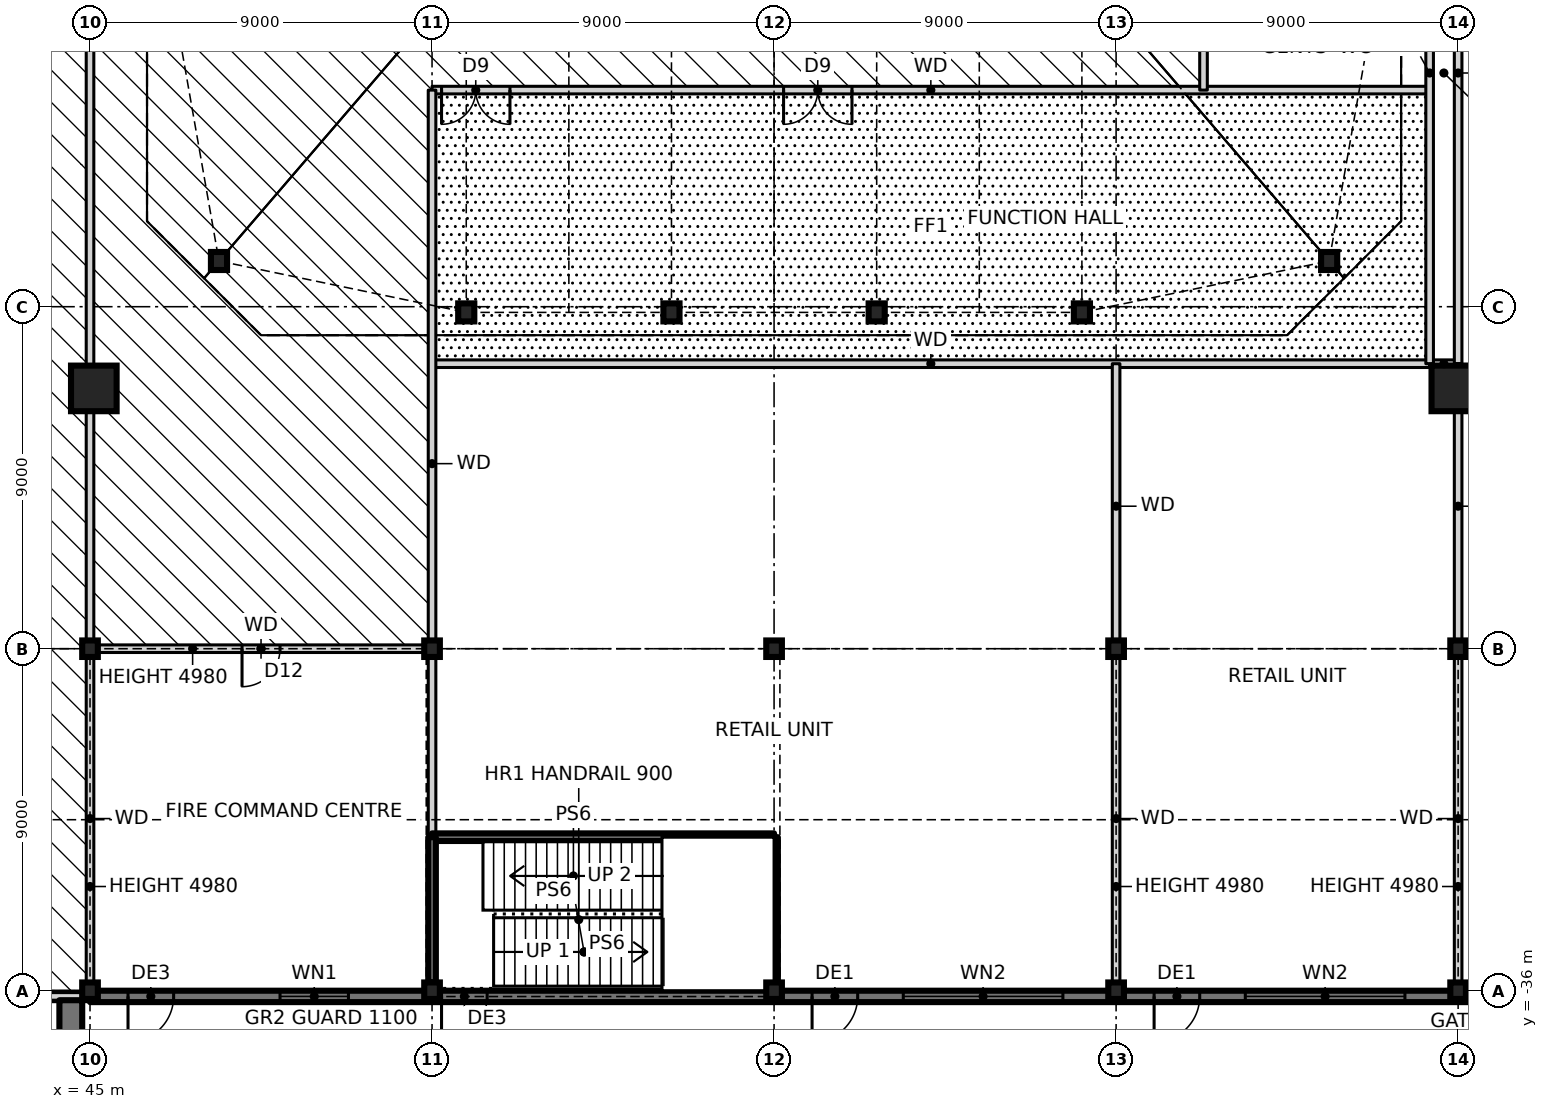
"""IFC4 building model, lengths in metres.
Left out: names, types, materials, properties, quantities, classifications, styles, units other than length and angle.
Written with IfcOpenShell. Run it as: python <this file> out.ifc"""

import sys

from ifc_helpers import new_model, si_unit, direction, frame, frame_2d, origin, origin_2d, place, context, subcontext, project, spatial, rectangle, hollow_rectangle, i_section, extrude, element, fill, save


model = new_model("IFC4")
c1 = context("Model", 3, precision=1e-05, world=origin(), true_north=direction((0.0, 1.0)))
c2 = subcontext(c1, "Body", "Model", "MODEL_VIEW")
j1 = project(units=[si_unit("LENGTHUNIT", "METRE"), si_unit("PLANEANGLEUNIT", "RADIAN")], contexts=[c1])
p1 = place(None, origin())
s1 = spatial("IfcSite", under=j1, at=p1, CompositionType="ELEMENT")
p2 = place(p1, origin())
s2 = spatial("IfcBuilding", under=s1, at=p2, CompositionType="ELEMENT")
p3 = place(p2, origin())
s3 = spatial("IfcBuildingStorey", under=s2, at=p3, CompositionType="ELEMENT", Elevation=0.0)
for number, where, z_axis, x_axis in (
    (1, (48.394, -16.797, 0.0), (0.0, 0.0, 1.0), (1.0, 0.0, 0.0)),
    (2, (54.9, -18.15, 0.0), (0.0, 0.0, 1.0), (1.0, 0.0, 0.0)),
    (3, (60.3, -18.15, 0.0), (0.0, 0.0, 1.0), (1.0, 0.0, 0.0)),
    (4, (65.7, -18.15, 0.0), (0.0, 0.0, 1.0), (1.0, 0.0, 0.0)),
    (5, (71.1, -18.15, 0.0), (0.0, 0.0, 1.0), (1.0, 0.0, 0.0)),
    (6, (77.606, -16.797, 0.0), (0.0, 0.0, 1.0), (1.0, 0.0, 0.0)),
):
    element("IfcColumn", number, at=place(p3, frame(where, z_axis=z_axis, x_axis=x_axis)), inside=s3, PredefinedType="COLUMN", context=c2, shape_type="SweptSolid", body=[
        extrude(i_section(OverallWidth=0.424, OverallDepth=0.475, WebThickness=0.048, FlangeThickness=0.077, at=origin_2d()), origin(), (0.0, 0.0, 1.0), 6.0),
    ])
for number, where, z_axis, x_axis in (
    (7, (45.1, -20.15, 0.0), (0.0, 0.0, 1.0), (1.0, 0.0, 0.0)),
    (8, (80.9, -20.15, 0.0), (0.0, 0.0, 1.0), (1.0, 0.0, 0.0)),
):
    element("IfcColumn", number, at=place(p3, frame(where, z_axis=z_axis, x_axis=x_axis)), inside=s3, PredefinedType="COLUMN", context=c2, shape_type="SweptSolid", body=[
        extrude(hollow_rectangle(XDim=1.2, YDim=1.2, WallThickness=0.07, at=origin_2d()), origin(), (0.0, 0.0, 1.0), 6.0),
    ])
for number, where, z_axis, x_axis in (
    (9, (45.0, -36.0, 0.0), (0.0, 0.0, 1.0), (1.0, 0.0, 0.0)),
    (10, (45.0, -27.0, 0.0), (0.0, 0.0, 1.0), (1.0, 0.0, 0.0)),
    (11, (54.0, -36.0, 0.0), (0.0, 0.0, 1.0), (1.0, 0.0, 0.0)),
    (12, (54.0, -27.0, 0.0), (0.0, 0.0, 1.0), (1.0, 0.0, 0.0)),
    (13, (63.0, -36.0, 0.0), (0.0, 0.0, 1.0), (1.0, 0.0, 0.0)),
    (14, (63.0, -27.0, 0.0), (0.0, 0.0, 1.0), (1.0, 0.0, 0.0)),
    (15, (72.0, -36.0, 0.0), (0.0, 0.0, 1.0), (1.0, 0.0, 0.0)),
    (16, (72.0, -27.0, 0.0), (0.0, 0.0, 1.0), (1.0, 0.0, 0.0)),
    (17, (81.0, -36.0, 0.0), (0.0, 0.0, 1.0), (1.0, 0.0, 0.0)),
    (18, (81.0, -27.0, 0.0), (0.0, 0.0, 1.0), (1.0, 0.0, 0.0)),
):
    element("IfcColumn", number, at=place(p3, frame(where, z_axis=z_axis, x_axis=x_axis)), inside=s3, PredefinedType="COLUMN", context=c2, shape_type="SweptSolid", body=[
        extrude(i_section(OverallWidth=0.411, OverallDepth=0.434, WebThickness=0.036, FlangeThickness=0.057, at=origin_2d()), origin(), (0.0, 0.0, 1.0), 6.0),
    ])
p4 = place(p3, frame((36.0, -36.15, -0.25), z_axis=(0.0, 0.0, 1.0), x_axis=(1.0, 0.0, 0.0)))
e19 = element("IfcWall", 19, at=p4, inside=s3, PredefinedType="SOLIDWALL", context=c2, shape_type="SweptSolid", body=[
    extrude(rectangle(XDim=9.0, YDim=0.2, at=frame_2d((4.5, 0.0))), origin(), (0.0, 0.0, 1.0), 6.25),
])
p5 = place(p4, frame((3.3, 0.0, 0.25)))
e20 = element("IfcOpeningElement", 20, at=p5, cuts=e19, PredefinedType="OPENING", context=c2, shape_type="SweptSolid", body=[
    extrude(rectangle(XDim=2.4, YDim=3.0, at=frame_2d((1.2, 1.5))), frame((0.0, 0.11, 0.0), z_axis=(0.0, -1.0, 0.0), x_axis=(1.0, 0.0, 0.0)), (0.0, 0.0, 1.0), 0.22),
])
p6 = place(p3, frame((45.0, -36.15, -0.25), z_axis=(0.0, 0.0, 1.0), x_axis=(1.0, 0.0, 0.0)))
e21 = element("IfcWall", 21, at=p6, inside=s3, PredefinedType="SOLIDWALL", context=c2, shape_type="SweptSolid", body=[
    extrude(rectangle(XDim=9.0, YDim=0.3, at=frame_2d((4.5, 0.0))), origin(), (0.0, 0.0, 1.0), 6.25),
])
p7 = place(p6, frame((1.0, 0.0, 0.25)))
e22 = element("IfcOpeningElement", 22, at=p7, cuts=e21, PredefinedType="OPENING", context=c2, shape_type="SweptSolid", body=[
    extrude(rectangle(XDim=1.2, YDim=2.4, at=frame_2d((0.6, 1.2))), frame((0.0, 0.16, 0.0), z_axis=(0.0, -1.0, 0.0), x_axis=(1.0, 0.0, 0.0)), (0.0, 0.0, 1.0), 0.32),
])
p8 = place(p6, frame((5.0, 0.0, 1.15)))
e23 = element("IfcOpeningElement", 23, at=p8, cuts=e21, PredefinedType="OPENING", context=c2, shape_type="SweptSolid", body=[
    extrude(rectangle(XDim=1.8, YDim=2.4, at=frame_2d((0.9, 1.2))), frame((0.0, 0.16, 0.0), z_axis=(0.0, -1.0, 0.0), x_axis=(1.0, 0.0, 0.0)), (0.0, 0.0, 1.0), 0.32),
])
p9 = place(p3, frame((54.0, -36.15, -0.25), z_axis=(0.0, 0.0, 1.0), x_axis=(1.0, 0.0, 0.0)))
e24 = element("IfcWall", 24, at=p9, inside=s3, PredefinedType="SOLIDWALL", context=c2, shape_type="SweptSolid", body=[
    extrude(rectangle(XDim=9.0, YDim=0.3, at=frame_2d((4.5, 0.0))), origin(), (0.0, 0.0, 1.0), 6.25),
])
p10 = place(p9, frame((0.25, 0.0, 0.25)))
e25 = element("IfcOpeningElement", 25, at=p10, cuts=e24, PredefinedType="OPENING", context=c2, shape_type="SweptSolid", body=[
    extrude(rectangle(XDim=1.2, YDim=2.4, at=frame_2d((0.6, 1.2))), frame((0.0, 0.16, 0.0), z_axis=(0.0, -1.0, 0.0), x_axis=(1.0, 0.0, 0.0)), (0.0, 0.0, 1.0), 0.32),
])
p11 = place(p3, frame((63.0, -36.15, -0.25), z_axis=(0.0, 0.0, 1.0), x_axis=(1.0, 0.0, 0.0)))
e26 = element("IfcWall", 26, at=p11, inside=s3, PredefinedType="SOLIDWALL", context=c2, shape_type="SweptSolid", body=[
    extrude(rectangle(XDim=9.0, YDim=0.3, at=frame_2d((4.5, 0.0))), origin(), (0.0, 0.0, 1.0), 6.25),
])
p12 = place(p11, frame((1.0, 0.0, 0.25)))
e27 = element("IfcOpeningElement", 27, at=p12, cuts=e26, PredefinedType="OPENING", context=c2, shape_type="SweptSolid", body=[
    extrude(rectangle(XDim=1.2, YDim=2.4, at=frame_2d((0.6, 1.2))), frame((0.0, 0.16, 0.0), z_axis=(0.0, -1.0, 0.0), x_axis=(1.0, 0.0, 0.0)), (0.0, 0.0, 1.0), 0.32),
])
p13 = place(p11, frame((3.4, 0.0, 0.85)))
e28 = element("IfcOpeningElement", 28, at=p13, cuts=e26, PredefinedType="OPENING", context=c2, shape_type="SweptSolid", body=[
    extrude(rectangle(XDim=4.2, YDim=3.6, at=frame_2d((2.1, 1.8))), frame((0.0, 0.16, 0.0), z_axis=(0.0, -1.0, 0.0), x_axis=(1.0, 0.0, 0.0)), (0.0, 0.0, 1.0), 0.32),
])
p14 = place(p3, frame((72.0, -36.15, -0.25), z_axis=(0.0, 0.0, 1.0), x_axis=(1.0, 0.0, 0.0)))
e29 = element("IfcWall", 29, at=p14, inside=s3, PredefinedType="SOLIDWALL", context=c2, shape_type="SweptSolid", body=[
    extrude(rectangle(XDim=9.0, YDim=0.3, at=frame_2d((4.5, 0.0))), origin(), (0.0, 0.0, 1.0), 6.25),
])
p15 = place(p14, frame((1.0, 0.0, 0.25)))
e30 = element("IfcOpeningElement", 30, at=p15, cuts=e29, PredefinedType="OPENING", context=c2, shape_type="SweptSolid", body=[
    extrude(rectangle(XDim=1.2, YDim=2.4, at=frame_2d((0.6, 1.2))), frame((0.0, 0.16, 0.0), z_axis=(0.0, -1.0, 0.0), x_axis=(1.0, 0.0, 0.0)), (0.0, 0.0, 1.0), 0.32),
])
p16 = place(p14, frame((3.4, 0.0, 0.85)))
e31 = element("IfcOpeningElement", 31, at=p16, cuts=e29, PredefinedType="OPENING", context=c2, shape_type="SweptSolid", body=[
    extrude(rectangle(XDim=4.2, YDim=3.6, at=frame_2d((2.1, 1.8))), frame((0.0, 0.16, 0.0), z_axis=(0.0, -1.0, 0.0), x_axis=(1.0, 0.0, 0.0)), (0.0, 0.0, 1.0), 0.32),
])
p17 = place(p3, frame((81.0, -36.15, -0.25), z_axis=(0.0, 0.0, 1.0), x_axis=(1.0, 0.0, 0.0)))
e32 = element("IfcWall", 32, at=p17, inside=s3, PredefinedType="SOLIDWALL", context=c2, shape_type="SweptSolid", body=[
    extrude(rectangle(XDim=9.0, YDim=0.3, at=frame_2d((4.5, 0.0))), origin(), (0.0, 0.0, 1.0), 6.25),
])
p18 = place(p17, frame((1.5, 0.0, 0.25)))
e33 = element("IfcOpeningElement", 33, at=p18, cuts=e32, PredefinedType="OPENING", context=c2, shape_type="SweptSolid", body=[
    extrude(rectangle(XDim=6.0, YDim=4.5, at=frame_2d((3.0, 2.25))), frame((0.0, 0.16, 0.0), z_axis=(0.0, -1.0, 0.0), x_axis=(1.0, 0.0, 0.0)), (0.0, 0.0, 1.0), 0.32),
])
p19 = place(p3, frame((44.494, -36.25, -0.15), z_axis=(0.0, 0.0, 1.0), x_axis=(0.0, -1.0, 0.0)))
e34 = element("IfcWall", 34, at=p19, inside=s3, PredefinedType="SOLIDWALL", context=c2, shape_type="SweptSolid", body=[
    extrude(rectangle(XDim=3.05, YDim=0.6, at=frame_2d((1.525, 0.0))), origin(), (0.0, 0.0, 1.0), 9.15),
])
p20 = place(p3, frame((54.0, -31.96, -0.25), z_axis=(0.0, 0.0, 1.0), x_axis=(1.0, 0.0, 0.0)))
e35 = element("IfcWall", 35, at=p20, inside=s3, PredefinedType="SOLIDWALL", context=c2, shape_type="SweptSolid", body=[
    extrude(rectangle(XDim=9.0, YDim=0.2, at=frame_2d((4.5, 0.0))), origin(), (0.0, 0.0, 1.0), 6.25),
])
p21 = place(p3, frame((45.0, -27.0, 0.0), z_axis=(0.0, 0.0, 1.0), x_axis=(1.0, 0.0, 0.0)))
e36 = element("IfcWall", 36, at=p21, inside=s3, PredefinedType="SOLIDWALL", context=c2, shape_type="SweptSolid", body=[
    extrude(rectangle(XDim=9.0, YDim=0.2, at=frame_2d((4.5, 0.0))), origin(), (0.0, 0.0, 1.0), 4.98),
])
p22 = place(p21, frame((4.0, 0.0, 0.0)))
e37 = element("IfcOpeningElement", 37, at=p22, cuts=e36, PredefinedType="OPENING", context=c2, shape_type="SweptSolid", body=[
    extrude(rectangle(XDim=1.0, YDim=2.1, at=frame_2d((0.5, 1.05))), frame((0.0, 0.11, 0.0), z_axis=(0.0, -1.0, 0.0), x_axis=(1.0, 0.0, 0.0)), (0.0, 0.0, 1.0), 0.22),
])
p23 = place(p3, frame((81.0, -27.0, 0.0), z_axis=(0.0, 0.0, 1.0), x_axis=(1.0, 0.0, 0.0)))
e38 = element("IfcWall", 38, at=p23, inside=s3, PredefinedType="SOLIDWALL", context=c2, shape_type="SweptSolid", body=[
    extrude(rectangle(XDim=8.94, YDim=0.2, at=frame_2d((4.47, 0.0))), origin(), (0.0, 0.0, 1.0), 4.98),
])
p24 = place(p3, frame((54.0, -19.5, 0.0), z_axis=(0.0, 0.0, 1.0), x_axis=(1.0, 0.0, 0.0)))
e39 = element("IfcWall", 39, at=p24, inside=s3, PredefinedType="SOLIDWALL", context=c2, shape_type="SweptSolid", body=[
    extrude(rectangle(XDim=26.25, YDim=0.2, at=frame_2d((13.125, 0.0))), origin(), (0.0, 0.0, 1.0), 5.75),
])
p25 = place(p3, frame((80.25, -19.5, 0.0), z_axis=(0.0, 0.0, 1.0), x_axis=(1.0, 0.0, 0.0)))
e40 = element("IfcWall", 40, at=p25, inside=s3, PredefinedType="SOLIDWALL", context=c2, shape_type="SweptSolid", body=[
    extrude(rectangle(XDim=0.75, YDim=0.2, at=frame_2d((0.375, 0.0))), origin(), (0.0, 0.0, 1.0), 6.0),
])
p26 = place(p3, frame((54.0, -12.3, 0.0), z_axis=(0.0, 0.0, 1.0), x_axis=(1.0, 0.0, 0.0)))
e41 = element("IfcWall", 41, at=p26, inside=s3, PredefinedType="SOLIDWALL", context=c2, shape_type="SweptSolid", body=[
    extrude(rectangle(XDim=26.25, YDim=0.2, at=frame_2d((13.125, 0.0))), origin(), (0.0, 0.0, 1.0), 5.75),
])
p27 = place(p26, frame((9.25, 0.0, 0.0)))
e42 = element("IfcOpeningElement", 42, at=p27, cuts=e41, PredefinedType="OPENING", context=c2, shape_type="SweptSolid", body=[
    extrude(rectangle(XDim=1.8, YDim=2.1, at=frame_2d((0.9, 1.05))), frame((0.0, 0.11, 0.0), z_axis=(0.0, -1.0, 0.0), x_axis=(1.0, 0.0, 0.0)), (0.0, 0.0, 1.0), 0.22),
])
p28 = place(p26, frame((0.25, 0.0, 0.0)))
e43 = element("IfcOpeningElement", 43, at=p28, cuts=e41, PredefinedType="OPENING", context=c2, shape_type="SweptSolid", body=[
    extrude(rectangle(XDim=1.8, YDim=2.1, at=frame_2d((0.9, 1.05))), frame((0.0, 0.11, 0.0), z_axis=(0.0, -1.0, 0.0), x_axis=(1.0, 0.0, 0.0)), (0.0, 0.0, 1.0), 0.22),
])
p29 = place(p3, frame((81.0, -35.94, 0.0), z_axis=(0.0, 0.0, 1.0), x_axis=(0.0, 1.0, 0.0)))
e44 = element("IfcWall", 44, at=p29, inside=s3, PredefinedType="SOLIDWALL", context=c2, shape_type="SweptSolid", body=[
    extrude(rectangle(XDim=8.94, YDim=0.2, at=frame_2d((4.47, 0.0))), origin(), (0.0, 0.0, 1.0), 4.98),
])
for number, where, z_axis, x_axis in (
    (45, (81.0, -19.5, 0.0), (0.0, 0.0, 1.0), (0.0, 1.0, 0.0)),
    (46, (80.25, -19.5, 0.0), (0.0, 0.0, 1.0), (0.0, 1.0, 0.0)),
):
    element("IfcWall", number, at=place(p3, frame(where, z_axis=z_axis, x_axis=x_axis)), inside=s3, PredefinedType="SOLIDWALL", context=c2, shape_type="SweptSolid", body=[
        extrude(rectangle(XDim=15.3, YDim=0.2, at=frame_2d((7.65, 0.0))), origin(), (0.0, 0.0, 1.0), 6.0),
    ])
p30 = place(p3, frame((74.3, -12.3, 0.0), z_axis=(0.0, 0.0, 1.0), x_axis=(0.0, 1.0, 0.0)))
e47 = element("IfcWall", 47, at=p30, inside=s3, PredefinedType="SOLIDWALL", context=c2, shape_type="SweptSolid", body=[
    extrude(rectangle(XDim=8.6, YDim=0.2, at=frame_2d((4.3, 0.0))), origin(), (0.0, 0.0, 1.0), 5.75),
])
p31 = place(p30, frame((1.05, 0.0, 0.0)))
e48 = element("IfcOpeningElement", 48, at=p31, cuts=e47, PredefinedType="OPENING", context=c2, shape_type="SweptSolid", body=[
    extrude(rectangle(XDim=0.9, YDim=2.1, at=frame_2d((0.45, 1.05))), frame((0.0, 0.11, 0.0), z_axis=(0.0, -1.0, 0.0), x_axis=(1.0, 0.0, 0.0)), (0.0, 0.0, 1.0), 0.22),
])
p32 = place(p30, frame((4.05, 0.0, 0.0)))
e49 = element("IfcOpeningElement", 49, at=p32, cuts=e47, PredefinedType="OPENING", context=c2, shape_type="SweptSolid", body=[
    extrude(rectangle(XDim=0.9, YDim=2.1, at=frame_2d((0.45, 1.05))), frame((0.0, 0.11, 0.0), z_axis=(0.0, -1.0, 0.0), x_axis=(1.0, 0.0, 0.0)), (0.0, 0.0, 1.0), 0.22),
])
p33 = place(p3, frame((72.0, -35.94, 0.0), z_axis=(0.0, 0.0, 1.0), x_axis=(0.0, 1.0, 0.0)))
e50 = element("IfcWall", 50, at=p33, inside=s3, PredefinedType="SOLIDWALL", context=c2, shape_type="SweptSolid", body=[
    extrude(rectangle(XDim=8.94, YDim=0.2, at=frame_2d((4.47, 0.0))), origin(), (0.0, 0.0, 1.0), 4.98),
])
for number, where, z_axis, x_axis in (
    (51, (63.0, -35.783, -0.25), (0.0, 0.0, 1.0), (0.0, 1.0, 0.0)),
    (52, (54.0, -35.783, -0.25), (0.0, 0.0, 1.0), (0.0, 1.0, 0.0)),
):
    element("IfcWall", number, at=place(p3, frame(where, z_axis=z_axis, x_axis=x_axis)), inside=s3, PredefinedType="SOLIDWALL", context=c2, shape_type="SweptSolid", body=[
        extrude(rectangle(XDim=3.823, YDim=0.2, at=frame_2d((1.911, 0.0))), origin(), (0.0, 0.0, 1.0), 6.25),
    ])
p34 = place(p3, frame((54.0, -31.96, 0.0), z_axis=(0.0, 0.0, 1.0), x_axis=(0.0, 1.0, 0.0)))
e53 = element("IfcWall", 53, at=p34, inside=s3, PredefinedType="SOLIDWALL", context=c2, shape_type="SweptSolid", body=[
    extrude(rectangle(XDim=19.66, YDim=0.2, at=frame_2d((9.83, 0.0))), origin(), (0.0, 0.0, 1.0), 5.75),
])
p35 = place(p3, frame((45.0, -35.94, 0.0), z_axis=(0.0, 0.0, 1.0), x_axis=(0.0, 1.0, 0.0)))
e54 = element("IfcWall", 54, at=p35, inside=s3, PredefinedType="SOLIDWALL", context=c2, shape_type="SweptSolid", body=[
    extrude(rectangle(XDim=8.94, YDim=0.2, at=frame_2d((4.47, 0.0))), origin(), (0.0, 0.0, 1.0), 4.98),
])
for number, where, z_axis, x_axis in (
    (55, (81.0, -27.0, 0.0), (0.0, 0.0, 1.0), (0.0, 1.0, 0.0)),
    (56, (72.0, -27.0, 0.0), (0.0, 0.0, 1.0), (0.0, 1.0, 0.0)),
):
    element("IfcWall", number, at=place(p3, frame(where, z_axis=z_axis, x_axis=x_axis)), inside=s3, PredefinedType="SOLIDWALL", context=c2, shape_type="SweptSolid", body=[
        extrude(rectangle(XDim=7.5, YDim=0.2, at=frame_2d((3.75, 0.0))), origin(), (0.0, 0.0, 1.0), 5.75),
    ])
p36 = place(p3, frame((45.0, -27.0, 0.0), z_axis=(0.0, 0.0, 1.0), x_axis=(0.0, 1.0, 0.0)))
e57 = element("IfcWall", 57, at=p36, inside=s3, PredefinedType="SOLIDWALL", context=c2, shape_type="SweptSolid", body=[
    extrude(rectangle(XDim=54.0, YDim=0.2, at=frame_2d((27.0, 0.0))), origin(), (0.0, 0.0, 1.0), 5.75),
])
p37 = place(p36, frame((18.75, 0.0, 0.0)))
e58 = element("IfcOpeningElement", 58, at=p37, cuts=e57, PredefinedType="OPENING", context=c2, shape_type="SweptSolid", body=[
    extrude(rectangle(XDim=1.8, YDim=2.4, at=frame_2d((0.9, 1.2))), frame((0.0, 0.11, 0.0), z_axis=(0.0, -1.0, 0.0), x_axis=(1.0, 0.0, 0.0)), (0.0, 0.0, 1.0), 0.22),
])
p38 = place(p7, frame((1.2, 0.0, 0.0), z_axis=(0.0, 0.0, 1.0), x_axis=(-1.0, 0.0, 0.0)))
e59 = element("IfcDoor", 59, at=p38, inside=s3, OperationType="SINGLE_SWING_RIGHT", PredefinedType="DOOR", context=c2, shape_type="SweptSolid", body=[
    extrude(rectangle(XDim=1.2, YDim=2.4, at=frame_2d((0.6, 1.2))), frame((0.0, 0.025, 0.0), z_axis=(0.0, -1.0, 0.0), x_axis=(1.0, 0.0, 0.0)), (0.0, 0.0, 1.0), 0.05),
])
fill(e22, e59)
p39 = place(p8, origin())
e60 = element("IfcWindow", 60, at=p39, inside=s3, PartitioningType="SINGLE_PANEL", PredefinedType="WINDOW", context=c2, shape_type="SweptSolid", body=[
    extrude(rectangle(XDim=1.8, YDim=2.4, at=frame_2d((0.9, 1.2))), frame((0.0, 0.03, 0.0), z_axis=(0.0, -1.0, 0.0), x_axis=(1.0, 0.0, 0.0)), (0.0, 0.0, 1.0), 0.06),
])
fill(e23, e60)
p40 = place(p10, frame((1.2, 0.0, 0.0), z_axis=(0.0, 0.0, 1.0), x_axis=(-1.0, 0.0, 0.0)))
e61 = element("IfcDoor", 61, at=p40, inside=s3, OperationType="SINGLE_SWING_RIGHT", PredefinedType="DOOR", context=c2, shape_type="SweptSolid", body=[
    extrude(rectangle(XDim=1.2, YDim=2.4, at=frame_2d((0.6, 1.2))), frame((0.0, 0.025, 0.0), z_axis=(0.0, -1.0, 0.0), x_axis=(1.0, 0.0, 0.0)), (0.0, 0.0, 1.0), 0.05),
])
fill(e25, e61)
p41 = place(p12, frame((1.2, 0.0, 0.0), z_axis=(0.0, 0.0, 1.0), x_axis=(-1.0, 0.0, 0.0)))
e62 = element("IfcDoor", 62, at=p41, inside=s3, OperationType="SINGLE_SWING_RIGHT", PredefinedType="DOOR", context=c2, shape_type="SweptSolid", body=[
    extrude(rectangle(XDim=1.2, YDim=2.4, at=frame_2d((0.6, 1.2))), frame((0.0, 0.025, 0.0), z_axis=(0.0, -1.0, 0.0), x_axis=(1.0, 0.0, 0.0)), (0.0, 0.0, 1.0), 0.05),
])
fill(e27, e62)
p42 = place(p13, origin())
e63 = element("IfcWindow", 63, at=p42, inside=s3, PartitioningType="SINGLE_PANEL", PredefinedType="WINDOW", context=c2, shape_type="SweptSolid", body=[
    extrude(rectangle(XDim=4.2, YDim=3.6, at=frame_2d((2.1, 1.8))), frame((0.0, 0.03, 0.0), z_axis=(0.0, -1.0, 0.0), x_axis=(1.0, 0.0, 0.0)), (0.0, 0.0, 1.0), 0.06),
])
fill(e28, e63)
p43 = place(p15, frame((1.2, 0.0, 0.0), z_axis=(0.0, 0.0, 1.0), x_axis=(-1.0, 0.0, 0.0)))
e64 = element("IfcDoor", 64, at=p43, inside=s3, OperationType="SINGLE_SWING_RIGHT", PredefinedType="DOOR", context=c2, shape_type="SweptSolid", body=[
    extrude(rectangle(XDim=1.2, YDim=2.4, at=frame_2d((0.6, 1.2))), frame((0.0, 0.025, 0.0), z_axis=(0.0, -1.0, 0.0), x_axis=(1.0, 0.0, 0.0)), (0.0, 0.0, 1.0), 0.05),
])
fill(e30, e64)
p44 = place(p16, origin())
e65 = element("IfcWindow", 65, at=p44, inside=s3, PartitioningType="SINGLE_PANEL", PredefinedType="WINDOW", context=c2, shape_type="SweptSolid", body=[
    extrude(rectangle(XDim=4.2, YDim=3.6, at=frame_2d((2.1, 1.8))), frame((0.0, 0.03, 0.0), z_axis=(0.0, -1.0, 0.0), x_axis=(1.0, 0.0, 0.0)), (0.0, 0.0, 1.0), 0.06),
])
fill(e31, e65)
p45 = place(p22, frame((1.0, 0.0, 0.0), z_axis=(0.0, 0.0, 1.0), x_axis=(-1.0, 0.0, 0.0)))
e66 = element("IfcDoor", 66, at=p45, inside=s3, OperationType="SINGLE_SWING_RIGHT", PredefinedType="DOOR", context=c2, shape_type="SweptSolid", body=[
    extrude(rectangle(XDim=1.0, YDim=2.1, at=frame_2d((0.5, 1.05))), frame((0.0, 0.025, 0.0), z_axis=(0.0, -1.0, 0.0), x_axis=(1.0, 0.0, 0.0)), (0.0, 0.0, 1.0), 0.05),
])
fill(e37, e66)
p46 = place(p27, frame((1.8, 0.0, 0.0), z_axis=(0.0, 0.0, 1.0), x_axis=(-1.0, 0.0, 0.0)))
e67 = element("IfcDoor", 67, at=p46, inside=s3, OperationType="DOUBLE_DOOR_SINGLE_SWING", PredefinedType="DOOR", context=c2, shape_type="SweptSolid", body=[
    extrude(rectangle(XDim=1.8, YDim=2.1, at=frame_2d((0.9, 1.05))), frame((0.0, 0.025, 0.0), z_axis=(0.0, -1.0, 0.0), x_axis=(1.0, 0.0, 0.0)), (0.0, 0.0, 1.0), 0.05),
])
fill(e42, e67)
p47 = place(p28, frame((1.8, 0.0, 0.0), z_axis=(0.0, 0.0, 1.0), x_axis=(-1.0, 0.0, 0.0)))
e68 = element("IfcDoor", 68, at=p47, inside=s3, OperationType="DOUBLE_DOOR_SINGLE_SWING", PredefinedType="DOOR", context=c2, shape_type="SweptSolid", body=[
    extrude(rectangle(XDim=1.8, YDim=2.1, at=frame_2d((0.9, 1.05))), frame((0.0, 0.025, 0.0), z_axis=(0.0, -1.0, 0.0), x_axis=(1.0, 0.0, 0.0)), (0.0, 0.0, 1.0), 0.05),
])
fill(e43, e68)
save(model, sys.argv[1])
